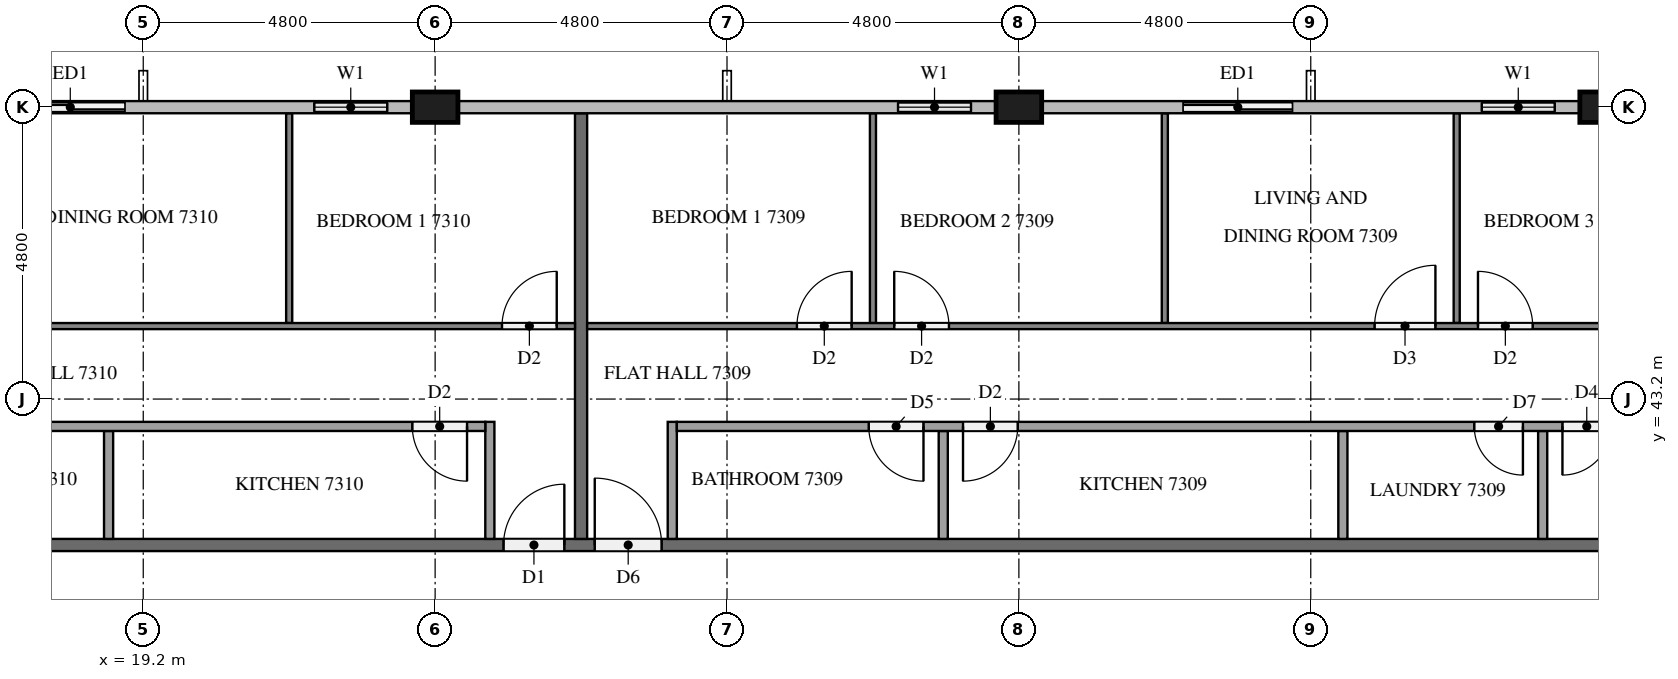
"""IFC4 building model, lengths in metres.
Left out: names, types, materials, properties, quantities, classifications, styles, units other than length and angle.
Written with IfcOpenShell. Run it as: python <this file> out.ifc"""

import sys

from ifc_helpers import new_model, si_unit, direction, frame, frame_2d, origin, origin_2d, place, context, subcontext, project, spatial, rectangle, extrude, element, fill, save


model = new_model("IFC4")
c1 = context("Model", 3, precision=1e-05, world=origin(), true_north=direction((0.0, 1.0)))
c2 = subcontext(c1, "Body", "Model", "MODEL_VIEW")
j1 = project(units=[si_unit("LENGTHUNIT", "METRE"), si_unit("PLANEANGLEUNIT", "RADIAN")], contexts=[c1])
p1 = place(None, origin())
s1 = spatial("IfcSite", under=j1, at=p1, CompositionType="ELEMENT")
p2 = place(p1, origin())
s2 = spatial("IfcBuilding", under=s1, at=p2, CompositionType="ELEMENT")
p3 = place(p2, frame((0.0, 0.0, 279.1)))
s3 = spatial("IfcBuildingStorey", under=s2, at=p3, CompositionType="ELEMENT", Elevation=279.1)
for number, where, z_axis, x_axis in (
    (1, (43.2, 48.0, 0.0), (0.0, 0.0, 1.0), (1.0, 0.0, 0.0)),
    (2, (33.6, 48.0, 0.0), (0.0, 0.0, 1.0), (1.0, 0.0, 0.0)),
    (3, (24.0, 48.0, 0.0), (0.0, 0.0, 1.0), (1.0, 0.0, 0.0)),
):
    element("IfcColumn", number, at=place(p3, frame(where, z_axis=z_axis, x_axis=x_axis)), inside=s3, PredefinedType="COLUMN", context=c2, shape_type="SweptSolid", body=[
        extrude(rectangle(XDim=0.75, YDim=0.5, at=origin_2d()), origin(), (0.0, 0.0, 1.0), 3.2),
    ])
p4 = place(p3, frame((42.825, 48.0, 0.0), z_axis=(0.0, 0.0, 1.0), x_axis=(-1.0, 0.0, 0.0)))
e4 = element("IfcWall", 4, at=p4, inside=s3, PredefinedType="SOLIDWALL", context=c2, shape_type="SweptSolid", body=[
    extrude(rectangle(XDim=2.025, YDim=0.15, at=frame_2d((1.012, 0.0))), origin(), (0.0, 0.0, 1.0), 3.2),
])
p5 = place(p4, frame((0.413, 0.0, 0.9)))
e5 = element("IfcOpeningElement", 5, at=p5, cuts=e4, PredefinedType="OPENING", context=c2, shape_type="SweptSolid", body=[
    extrude(rectangle(XDim=1.2, YDim=1.4, at=frame_2d((0.6, 0.7))), frame((0.0, 0.085, 0.0), z_axis=(0.0, -1.0, 0.0), x_axis=(1.0, 0.0, 0.0)), (0.0, 0.0, 1.0), 0.17),
])
p6 = place(p3, frame((38.4, 48.0, 0.0), z_axis=(0.0, 0.0, 1.0), x_axis=(-1.0, 0.0, 0.0)))
e6 = element("IfcWall", 6, at=p6, inside=s3, PredefinedType="SOLIDWALL", context=c2, shape_type="SweptSolid", body=[
    extrude(rectangle(XDim=2.4, YDim=0.15, at=frame_2d((1.2, 0.0))), origin(), (0.0, 0.0, 1.0), 3.2),
])
p7 = place(p6, frame((0.3, 0.0, 0.0)))
e7 = element("IfcOpeningElement", 7, at=p7, cuts=e6, PredefinedType="OPENING", context=c2, shape_type="SweptSolid", body=[
    extrude(rectangle(XDim=1.8, YDim=2.4, at=frame_2d((0.9, 1.2))), frame((0.0, 0.085, 0.0), z_axis=(0.0, -1.0, 0.0), x_axis=(1.0, 0.0, 0.0)), (0.0, 0.0, 1.0), 0.17),
])
p8 = place(p3, frame((33.225, 48.0, 0.0), z_axis=(0.0, 0.0, 1.0), x_axis=(-1.0, 0.0, 0.0)))
e8 = element("IfcWall", 8, at=p8, inside=s3, PredefinedType="SOLIDWALL", context=c2, shape_type="SweptSolid", body=[
    extrude(rectangle(XDim=2.025, YDim=0.15, at=frame_2d((1.013, 0.0))), origin(), (0.0, 0.0, 1.0), 3.2),
])
p9 = place(p8, frame((0.413, 0.0, 0.9)))
e9 = element("IfcOpeningElement", 9, at=p9, cuts=e8, PredefinedType="OPENING", context=c2, shape_type="SweptSolid", body=[
    extrude(rectangle(XDim=1.2, YDim=1.4, at=frame_2d((0.6, 0.7))), frame((0.0, 0.085, 0.0), z_axis=(0.0, -1.0, 0.0), x_axis=(1.0, 0.0, 0.0)), (0.0, 0.0, 1.0), 0.17),
])
p10 = place(p3, frame((23.625, 48.0, 0.0), z_axis=(0.0, 0.0, 1.0), x_axis=(-1.0, 0.0, 0.0)))
e10 = element("IfcWall", 10, at=p10, inside=s3, PredefinedType="SOLIDWALL", context=c2, shape_type="SweptSolid", body=[
    extrude(rectangle(XDim=2.025, YDim=0.15, at=frame_2d((1.012, 0.0))), origin(), (0.0, 0.0, 1.0), 3.2),
])
p11 = place(p10, frame((0.413, 0.0, 0.9)))
e11 = element("IfcOpeningElement", 11, at=p11, cuts=e10, PredefinedType="OPENING", context=c2, shape_type="SweptSolid", body=[
    extrude(rectangle(XDim=1.2, YDim=1.4, at=frame_2d((0.6, 0.7))), frame((0.0, 0.085, 0.0), z_axis=(0.0, -1.0, 0.0), x_axis=(1.0, 0.0, 0.0)), (0.0, 0.0, 1.0), 0.17),
])
p12 = place(p3, frame((19.2, 48.0, 0.0), z_axis=(0.0, 0.0, 1.0), x_axis=(-1.0, 0.0, 0.0)))
e12 = element("IfcWall", 12, at=p12, inside=s3, PredefinedType="SOLIDWALL", context=c2, shape_type="SweptSolid", body=[
    extrude(rectangle(XDim=2.4, YDim=0.15, at=frame_2d((1.2, 0.0))), origin(), (0.0, 0.0, 1.0), 3.2),
])
p13 = place(p12, frame((0.3, 0.0, 0.0)))
e13 = element("IfcOpeningElement", 13, at=p13, cuts=e12, PredefinedType="OPENING", context=c2, shape_type="SweptSolid", body=[
    extrude(rectangle(XDim=1.8, YDim=2.4, at=frame_2d((0.9, 1.2))), frame((0.0, 0.085, 0.0), z_axis=(0.0, -1.0, 0.0), x_axis=(1.0, 0.0, 0.0)), (0.0, 0.0, 1.0), 0.17),
])
p14 = place(p3, frame((11.9, 40.8, 0.0), z_axis=(0.0, 0.0, 1.0), x_axis=(1.0, 0.0, 0.0)))
e14 = element("IfcWall", 14, at=p14, inside=s3, PredefinedType="PARTITIONING", context=c2, shape_type="SweptSolid", body=[
    extrude(rectangle(XDim=38.6, YDim=0.2, at=frame_2d((19.3, 0.0))), origin(), (0.0, 0.0, 1.0), 3.2),
])
p15 = place(p14, frame((33.975, 0.0, 0.0)))
e15 = element("IfcOpeningElement", 15, at=p15, cuts=e14, PredefinedType="OPENING", context=c2, shape_type="SweptSolid", body=[
    extrude(rectangle(XDim=1.0, YDim=2.1, at=frame_2d((0.5, 1.05))), frame((0.0, 0.11, 0.0), z_axis=(0.0, -1.0, 0.0), x_axis=(1.0, 0.0, 0.0)), (0.0, 0.0, 1.0), 0.22),
])
p16 = place(p14, frame((14.725, 0.0, 0.0)))
e16 = element("IfcOpeningElement", 16, at=p16, cuts=e14, PredefinedType="OPENING", context=c2, shape_type="SweptSolid", body=[
    extrude(rectangle(XDim=1.1, YDim=2.1, at=frame_2d((0.55, 1.05))), frame((0.0, 0.11, 0.0), z_axis=(0.0, -1.0, 0.0), x_axis=(1.0, 0.0, 0.0)), (0.0, 0.0, 1.0), 0.22),
])
p17 = place(p14, frame((13.225, 0.0, 0.0)))
e17 = element("IfcOpeningElement", 17, at=p17, cuts=e14, PredefinedType="OPENING", context=c2, shape_type="SweptSolid", body=[
    extrude(rectangle(XDim=1.0, YDim=2.1, at=frame_2d((0.5, 1.05))), frame((0.0, 0.11, 0.0), z_axis=(0.0, -1.0, 0.0), x_axis=(1.0, 0.0, 0.0)), (0.0, 0.0, 1.0), 0.22),
])
p18 = place(p14, frame((1.225, 0.0, 0.0)))
e18 = element("IfcOpeningElement", 18, at=p18, cuts=e14, PredefinedType="OPENING", context=c2, shape_type="SweptSolid", body=[
    extrude(rectangle(XDim=1.0, YDim=2.1, at=frame_2d((0.5, 1.05))), frame((0.0, 0.11, 0.0), z_axis=(0.0, -1.0, 0.0), x_axis=(1.0, 0.0, 0.0)), (0.0, 0.0, 1.0), 0.22),
])
p19 = place(p3, frame((26.4, 47.9, 0.0), z_axis=(0.0, 0.0, 1.0), x_axis=(0.0, -1.0, 0.0)))
e19 = element("IfcWall", 19, at=p19, inside=s3, PredefinedType="PARTITIONING", context=c2, shape_type="SweptSolid", body=[
    extrude(rectangle(XDim=7.0, YDim=0.2, at=frame_2d((3.5, 0.0))), origin(), (0.0, 0.0, 1.0), 3.2),
])
for number, where, z_axis, x_axis in (
    (20, (31.2, 44.45, 0.0), (0.0, 0.0, 1.0), (0.0, 1.0, 0.0)),
    (21, (36.0, 44.45, 0.0), (0.0, 0.0, 1.0), (0.0, 1.0, 0.0)),
    (22, (40.8, 44.45, 0.0), (0.0, 0.0, 1.0), (0.0, 1.0, 0.0)),
):
    element("IfcWall", number, at=place(p3, frame(where, z_axis=z_axis, x_axis=x_axis)), inside=s3, PredefinedType="PARTITIONING", context=c2, shape_type="SweptSolid", body=[
        extrude(rectangle(XDim=3.45, YDim=0.1, at=frame_2d((1.725, 0.0))), origin(), (0.0, 0.0, 1.0), 3.2),
    ])
p20 = place(p3, frame((26.5, 44.4, 0.0), z_axis=(0.0, 0.0, 1.0), x_axis=(1.0, 0.0, 0.0)))
e23 = element("IfcWall", 23, at=p20, inside=s3, PredefinedType="PARTITIONING", context=c2, shape_type="SweptSolid", body=[
    extrude(rectangle(XDim=19.0, YDim=0.1, at=frame_2d((9.5, 0.0))), origin(), (0.0, 0.0, 1.0), 3.2),
])
p21 = place(p20, frame((3.45, 0.0, 0.0)))
e24 = element("IfcOpeningElement", 24, at=p21, cuts=e23, PredefinedType="OPENING", context=c2, shape_type="SweptSolid", body=[
    extrude(rectangle(XDim=0.9, YDim=2.1, at=frame_2d((0.45, 1.05))), frame((0.0, 0.06, 0.0), z_axis=(0.0, -1.0, 0.0), x_axis=(1.0, 0.0, 0.0)), (0.0, 0.0, 1.0), 0.12),
])
p22 = place(p20, frame((5.05, 0.0, 0.0)))
e25 = element("IfcOpeningElement", 25, at=p22, cuts=e23, PredefinedType="OPENING", context=c2, shape_type="SweptSolid", body=[
    extrude(rectangle(XDim=0.9, YDim=2.1, at=frame_2d((0.45, 1.05))), frame((0.0, 0.06, 0.0), z_axis=(0.0, -1.0, 0.0), x_axis=(1.0, 0.0, 0.0)), (0.0, 0.0, 1.0), 0.12),
])
p23 = place(p20, frame((12.95, 0.0, 0.0)))
e26 = element("IfcOpeningElement", 26, at=p23, cuts=e23, PredefinedType="OPENING", context=c2, shape_type="SweptSolid", body=[
    extrude(rectangle(XDim=1.0, YDim=2.1, at=frame_2d((0.5, 1.05))), frame((0.0, 0.06, 0.0), z_axis=(0.0, -1.0, 0.0), x_axis=(1.0, 0.0, 0.0)), (0.0, 0.0, 1.0), 0.12),
])
p24 = place(p20, frame((14.65, 0.0, 0.0)))
e27 = element("IfcOpeningElement", 27, at=p24, cuts=e23, PredefinedType="OPENING", context=c2, shape_type="SweptSolid", body=[
    extrude(rectangle(XDim=0.9, YDim=2.1, at=frame_2d((0.45, 1.05))), frame((0.0, 0.06, 0.0), z_axis=(0.0, -1.0, 0.0), x_axis=(1.0, 0.0, 0.0)), (0.0, 0.0, 1.0), 0.12),
])
for number, where, z_axis, x_axis in (
    (28, (32.356, 40.9, 0.0), (0.0, 0.0, 1.0), (0.0, 1.0, 0.0)),
    (29, (38.928, 40.9, 0.0), (0.0, 0.0, 1.0), (0.0, 1.0, 0.0)),
    (30, (42.214, 40.9, 0.0), (0.0, 0.0, 1.0), (0.0, 1.0, 0.0)),
):
    element("IfcWall", number, at=place(p3, frame(where, z_axis=z_axis, x_axis=x_axis)), inside=s3, PredefinedType="PARTITIONING", context=c2, shape_type="SweptSolid", body=[
        extrude(rectangle(XDim=1.775, YDim=0.15, at=frame_2d((0.888, 0.0))), origin(), (0.0, 0.0, 1.0), 3.2),
    ])
p25 = place(p3, frame((27.9, 40.9, 0.0), z_axis=(0.0, 0.0, 1.0), x_axis=(0.0, 1.0, 0.0)))
e31 = element("IfcWall", 31, at=p25, inside=s3, PredefinedType="PARTITIONING", context=c2, shape_type="SweptSolid", body=[
    extrude(rectangle(XDim=1.925, YDim=0.15, at=frame_2d((0.962, 0.0))), origin(), (0.0, 0.0, 1.0), 3.2),
])
p26 = place(p3, frame((45.5, 42.75, 0.0), z_axis=(0.0, 0.0, 1.0), x_axis=(-1.0, 0.0, 0.0)))
e32 = element("IfcWall", 32, at=p26, inside=s3, PredefinedType="PARTITIONING", context=c2, shape_type="SweptSolid", body=[
    extrude(rectangle(XDim=17.525, YDim=0.15, at=frame_2d((8.762, 0.0))), origin(), (0.0, 0.0, 1.0), 3.2),
])
p27 = place(p26, frame((13.469, 0.0, 0.0)))
e33 = element("IfcOpeningElement", 33, at=p27, cuts=e32, PredefinedType="OPENING", context=c2, shape_type="SweptSolid", body=[
    extrude(rectangle(XDim=0.9, YDim=2.1, at=frame_2d((0.45, 1.05))), frame((0.0, 0.085, 0.0), z_axis=(0.0, -1.0, 0.0), x_axis=(1.0, 0.0, 0.0)), (0.0, 0.0, 1.0), 0.17),
])
p28 = place(p26, frame((11.919, 0.0, 0.0)))
e34 = element("IfcOpeningElement", 34, at=p28, cuts=e32, PredefinedType="OPENING", context=c2, shape_type="SweptSolid", body=[
    extrude(rectangle(XDim=0.9, YDim=2.1, at=frame_2d((0.45, 1.05))), frame((0.0, 0.085, 0.0), z_axis=(0.0, -1.0, 0.0), x_axis=(1.0, 0.0, 0.0)), (0.0, 0.0, 1.0), 0.17),
])
p29 = place(p26, frame((3.611, 0.0, 0.0)))
e35 = element("IfcOpeningElement", 35, at=p29, cuts=e32, PredefinedType="OPENING", context=c2, shape_type="SweptSolid", body=[
    extrude(rectangle(XDim=0.8, YDim=2.1, at=frame_2d((0.4, 1.05))), frame((0.0, 0.085, 0.0), z_axis=(0.0, -1.0, 0.0), x_axis=(1.0, 0.0, 0.0)), (0.0, 0.0, 1.0), 0.17),
])
p30 = place(p26, frame((2.161, 0.0, 0.0)))
e36 = element("IfcOpeningElement", 36, at=p30, cuts=e32, PredefinedType="OPENING", context=c2, shape_type="SweptSolid", body=[
    extrude(rectangle(XDim=0.8, YDim=2.1, at=frame_2d((0.4, 1.05))), frame((0.0, 0.085, 0.0), z_axis=(0.0, -1.0, 0.0), x_axis=(1.0, 0.0, 0.0)), (0.0, 0.0, 1.0), 0.17),
])
p31 = place(p3, frame((21.6, 44.45, 0.0), z_axis=(0.0, 0.0, 1.0), x_axis=(0.0, 1.0, 0.0)))
e37 = element("IfcWall", 37, at=p31, inside=s3, PredefinedType="PARTITIONING", context=c2, shape_type="SweptSolid", body=[
    extrude(rectangle(XDim=3.45, YDim=0.1, at=frame_2d((1.725, 0.0))), origin(), (0.0, 0.0, 1.0), 3.2),
])
p32 = place(p3, frame((14.5, 44.4, 0.0), z_axis=(0.0, 0.0, 1.0), x_axis=(1.0, 0.0, 0.0)))
e38 = element("IfcWall", 38, at=p32, inside=s3, PredefinedType="PARTITIONING", context=c2, shape_type="SweptSolid", body=[
    extrude(rectangle(XDim=11.8, YDim=0.1, at=frame_2d((5.9, 0.0))), origin(), (0.0, 0.0, 1.0), 3.2),
])
p33 = place(p32, frame((10.6, 0.0, 0.0)))
e39 = element("IfcOpeningElement", 39, at=p33, cuts=e38, PredefinedType="OPENING", context=c2, shape_type="SweptSolid", body=[
    extrude(rectangle(XDim=0.9, YDim=2.1, at=frame_2d((0.45, 1.05))), frame((0.0, 0.06, 0.0), z_axis=(0.0, -1.0, 0.0), x_axis=(1.0, 0.0, 0.0)), (0.0, 0.0, 1.0), 0.12),
])
p34 = place(p32, frame((0.3, 0.0, 0.0)))
e40 = element("IfcOpeningElement", 40, at=p34, cuts=e38, PredefinedType="OPENING", context=c2, shape_type="SweptSolid", body=[
    extrude(rectangle(XDim=1.0, YDim=2.1, at=frame_2d((0.5, 1.05))), frame((0.0, 0.06, 0.0), z_axis=(0.0, -1.0, 0.0), x_axis=(1.0, 0.0, 0.0)), (0.0, 0.0, 1.0), 0.12),
])
p35 = place(p3, frame((18.63, 40.9, 0.0), z_axis=(0.0, 0.0, 1.0), x_axis=(0.0, 1.0, 0.0)))
e41 = element("IfcWall", 41, at=p35, inside=s3, PredefinedType="PARTITIONING", context=c2, shape_type="SweptSolid", body=[
    extrude(rectangle(XDim=1.775, YDim=0.15, at=frame_2d((0.888, 0.0))), origin(), (0.0, 0.0, 1.0), 3.2),
])
p36 = place(p3, frame((24.9, 40.9, 0.0), z_axis=(0.0, 0.0, 1.0), x_axis=(0.0, 1.0, 0.0)))
e42 = element("IfcWall", 42, at=p36, inside=s3, PredefinedType="PARTITIONING", context=c2, shape_type="SweptSolid", body=[
    extrude(rectangle(XDim=1.925, YDim=0.15, at=frame_2d((0.962, 0.0))), origin(), (0.0, 0.0, 1.0), 3.2),
])
p37 = place(p3, frame((24.825, 42.75, 0.0), z_axis=(0.0, 0.0, 1.0), x_axis=(-1.0, 0.0, 0.0)))
e43 = element("IfcWall", 43, at=p37, inside=s3, PredefinedType="PARTITIONING", context=c2, shape_type="SweptSolid", body=[
    extrude(rectangle(XDim=10.325, YDim=0.15, at=frame_2d((5.163, 0.0))), origin(), (0.0, 0.0, 1.0), 3.2),
])
p38 = place(p37, frame((0.3, 0.0, 0.0)))
e44 = element("IfcOpeningElement", 44, at=p38, cuts=e43, PredefinedType="OPENING", context=c2, shape_type="SweptSolid", body=[
    extrude(rectangle(XDim=0.9, YDim=2.1, at=frame_2d((0.45, 1.05))), frame((0.0, 0.085, 0.0), z_axis=(0.0, -1.0, 0.0), x_axis=(1.0, 0.0, 0.0)), (0.0, 0.0, 1.0), 0.17),
])
p39 = place(p37, frame((9.175, 0.0, 0.0)))
e45 = element("IfcOpeningElement", 45, at=p39, cuts=e43, PredefinedType="OPENING", context=c2, shape_type="SweptSolid", body=[
    extrude(rectangle(XDim=0.8, YDim=2.1, at=frame_2d((0.4, 1.05))), frame((0.0, 0.085, 0.0), z_axis=(0.0, -1.0, 0.0), x_axis=(1.0, 0.0, 0.0)), (0.0, 0.0, 1.0), 0.17),
])
p40 = place(p5, origin())
e46 = element("IfcWindow", 46, at=p40, inside=s3, PartitioningType="SINGLE_PANEL", PredefinedType="WINDOW", context=c2, shape_type="SweptSolid", body=[
    extrude(rectangle(XDim=1.2, YDim=1.4, at=frame_2d((0.6, 0.7))), frame((0.0, 0.03, 0.0), z_axis=(0.0, -1.0, 0.0), x_axis=(1.0, 0.0, 0.0)), (0.0, 0.0, 1.0), 0.06),
])
fill(e5, e46)
p41 = place(p7, origin())
e47 = element("IfcDoor", 47, at=p41, inside=s3, OperationType="SLIDING_TO_LEFT", PredefinedType="DOOR", context=c2, shape_type="SweptSolid", body=[
    extrude(rectangle(XDim=1.8, YDim=2.4, at=frame_2d((0.9, 1.2))), frame((0.0, 0.025, 0.0), z_axis=(0.0, -1.0, 0.0), x_axis=(1.0, 0.0, 0.0)), (0.0, 0.0, 1.0), 0.05),
])
fill(e7, e47)
p42 = place(p9, origin())
e48 = element("IfcWindow", 48, at=p42, inside=s3, PartitioningType="SINGLE_PANEL", PredefinedType="WINDOW", context=c2, shape_type="SweptSolid", body=[
    extrude(rectangle(XDim=1.2, YDim=1.4, at=frame_2d((0.6, 0.7))), frame((0.0, 0.03, 0.0), z_axis=(0.0, -1.0, 0.0), x_axis=(1.0, 0.0, 0.0)), (0.0, 0.0, 1.0), 0.06),
])
fill(e9, e48)
p43 = place(p11, origin())
e49 = element("IfcWindow", 49, at=p43, inside=s3, PartitioningType="SINGLE_PANEL", PredefinedType="WINDOW", context=c2, shape_type="SweptSolid", body=[
    extrude(rectangle(XDim=1.2, YDim=1.4, at=frame_2d((0.6, 0.7))), frame((0.0, 0.03, 0.0), z_axis=(0.0, -1.0, 0.0), x_axis=(1.0, 0.0, 0.0)), (0.0, 0.0, 1.0), 0.06),
])
fill(e11, e49)
p44 = place(p13, origin())
e50 = element("IfcDoor", 50, at=p44, inside=s3, OperationType="SLIDING_TO_RIGHT", PredefinedType="DOOR", context=c2, shape_type="SweptSolid", body=[
    extrude(rectangle(XDim=1.8, YDim=2.4, at=frame_2d((0.9, 1.2))), frame((0.0, 0.025, 0.0), z_axis=(0.0, -1.0, 0.0), x_axis=(1.0, 0.0, 0.0)), (0.0, 0.0, 1.0), 0.05),
])
fill(e13, e50)
p45 = place(p16, origin())
e51 = element("IfcDoor", 51, at=p45, inside=s3, OperationType="SINGLE_SWING_LEFT", PredefinedType="DOOR", context=c2, shape_type="SweptSolid", body=[
    extrude(rectangle(XDim=1.1, YDim=2.1, at=frame_2d((0.55, 1.05))), frame((0.0, 0.025, 0.0), z_axis=(0.0, -1.0, 0.0), x_axis=(1.0, 0.0, 0.0)), (0.0, 0.0, 1.0), 0.05),
])
fill(e16, e51)
p46 = place(p17, origin())
e52 = element("IfcDoor", 52, at=p46, inside=s3, OperationType="SINGLE_SWING_RIGHT", PredefinedType="DOOR", context=c2, shape_type="SweptSolid", body=[
    extrude(rectangle(XDim=1.0, YDim=2.1, at=frame_2d((0.5, 1.05))), frame((0.0, 0.025, 0.0), z_axis=(0.0, -1.0, 0.0), x_axis=(1.0, 0.0, 0.0)), (0.0, 0.0, 1.0), 0.05),
])
fill(e17, e52)
p47 = place(p21, origin())
e53 = element("IfcDoor", 53, at=p47, inside=s3, OperationType="SINGLE_SWING_RIGHT", PredefinedType="DOOR", context=c2, shape_type="SweptSolid", body=[
    extrude(rectangle(XDim=0.9, YDim=2.1, at=frame_2d((0.45, 1.05))), frame((0.0, 0.025, 0.0), z_axis=(0.0, -1.0, 0.0), x_axis=(1.0, 0.0, 0.0)), (0.0, 0.0, 1.0), 0.05),
])
fill(e24, e53)
p48 = place(p22, origin())
e54 = element("IfcDoor", 54, at=p48, inside=s3, OperationType="SINGLE_SWING_LEFT", PredefinedType="DOOR", context=c2, shape_type="SweptSolid", body=[
    extrude(rectangle(XDim=0.9, YDim=2.1, at=frame_2d((0.45, 1.05))), frame((0.0, 0.025, 0.0), z_axis=(0.0, -1.0, 0.0), x_axis=(1.0, 0.0, 0.0)), (0.0, 0.0, 1.0), 0.05),
])
fill(e25, e54)
p49 = place(p23, origin())
e55 = element("IfcDoor", 55, at=p49, inside=s3, OperationType="SINGLE_SWING_RIGHT", PredefinedType="DOOR", context=c2, shape_type="SweptSolid", body=[
    extrude(rectangle(XDim=1.0, YDim=2.1, at=frame_2d((0.5, 1.05))), frame((0.0, 0.025, 0.0), z_axis=(0.0, -1.0, 0.0), x_axis=(1.0, 0.0, 0.0)), (0.0, 0.0, 1.0), 0.05),
])
fill(e26, e55)
p50 = place(p24, origin())
e56 = element("IfcDoor", 56, at=p50, inside=s3, OperationType="SINGLE_SWING_LEFT", PredefinedType="DOOR", context=c2, shape_type="SweptSolid", body=[
    extrude(rectangle(XDim=0.9, YDim=2.1, at=frame_2d((0.45, 1.05))), frame((0.0, 0.025, 0.0), z_axis=(0.0, -1.0, 0.0), x_axis=(1.0, 0.0, 0.0)), (0.0, 0.0, 1.0), 0.05),
])
fill(e27, e56)
p51 = place(p27, origin())
e57 = element("IfcDoor", 57, at=p51, inside=s3, OperationType="SINGLE_SWING_LEFT", PredefinedType="DOOR", context=c2, shape_type="SweptSolid", body=[
    extrude(rectangle(XDim=0.9, YDim=2.1, at=frame_2d((0.45, 1.05))), frame((0.0, 0.025, 0.0), z_axis=(0.0, -1.0, 0.0), x_axis=(1.0, 0.0, 0.0)), (0.0, 0.0, 1.0), 0.05),
])
fill(e33, e57)
p52 = place(p28, origin())
e58 = element("IfcDoor", 58, at=p52, inside=s3, OperationType="SINGLE_SWING_RIGHT", PredefinedType="DOOR", context=c2, shape_type="SweptSolid", body=[
    extrude(rectangle(XDim=0.9, YDim=2.1, at=frame_2d((0.45, 1.05))), frame((0.0, 0.025, 0.0), z_axis=(0.0, -1.0, 0.0), x_axis=(1.0, 0.0, 0.0)), (0.0, 0.0, 1.0), 0.05),
])
fill(e34, e58)
p53 = place(p29, origin())
e59 = element("IfcDoor", 59, at=p53, inside=s3, OperationType="SINGLE_SWING_LEFT", PredefinedType="DOOR", context=c2, shape_type="SweptSolid", body=[
    extrude(rectangle(XDim=0.8, YDim=2.1, at=frame_2d((0.4, 1.05))), frame((0.0, 0.025, 0.0), z_axis=(0.0, -1.0, 0.0), x_axis=(1.0, 0.0, 0.0)), (0.0, 0.0, 1.0), 0.05),
])
fill(e35, e59)
p54 = place(p30, origin())
e60 = element("IfcDoor", 60, at=p54, inside=s3, OperationType="SINGLE_SWING_RIGHT", PredefinedType="DOOR", context=c2, shape_type="SweptSolid", body=[
    extrude(rectangle(XDim=0.8, YDim=2.1, at=frame_2d((0.4, 1.05))), frame((0.0, 0.025, 0.0), z_axis=(0.0, -1.0, 0.0), x_axis=(1.0, 0.0, 0.0)), (0.0, 0.0, 1.0), 0.05),
])
fill(e36, e60)
p55 = place(p33, origin())
e61 = element("IfcDoor", 61, at=p55, inside=s3, OperationType="SINGLE_SWING_RIGHT", PredefinedType="DOOR", context=c2, shape_type="SweptSolid", body=[
    extrude(rectangle(XDim=0.9, YDim=2.1, at=frame_2d((0.45, 1.05))), frame((0.0, 0.025, 0.0), z_axis=(0.0, -1.0, 0.0), x_axis=(1.0, 0.0, 0.0)), (0.0, 0.0, 1.0), 0.05),
])
fill(e39, e61)
p56 = place(p38, origin())
e62 = element("IfcDoor", 62, at=p56, inside=s3, OperationType="SINGLE_SWING_LEFT", PredefinedType="DOOR", context=c2, shape_type="SweptSolid", body=[
    extrude(rectangle(XDim=0.9, YDim=2.1, at=frame_2d((0.45, 1.05))), frame((0.0, 0.025, 0.0), z_axis=(0.0, -1.0, 0.0), x_axis=(1.0, 0.0, 0.0)), (0.0, 0.0, 1.0), 0.05),
])
fill(e44, e62)
save(model, sys.argv[1])
